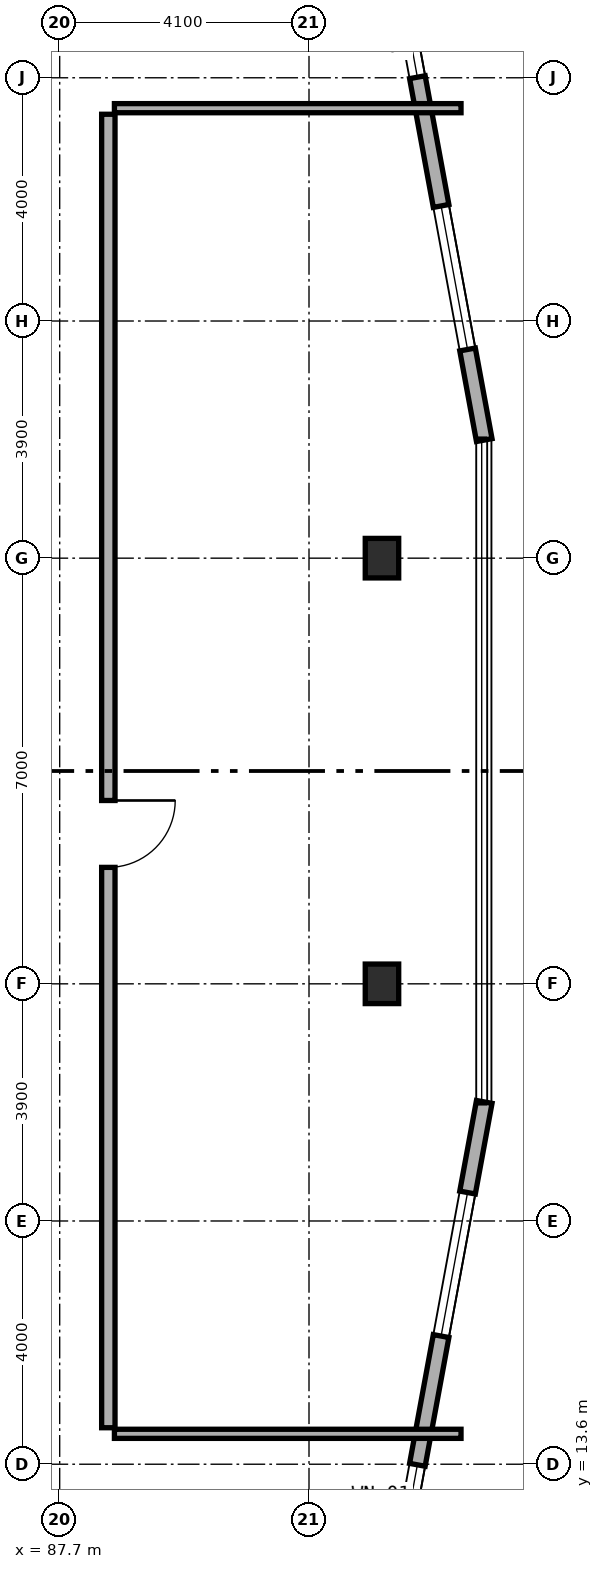
"""IFC4 building model, lengths in metres.
Left out: names, types, materials, properties, quantities, classifications, styles, units other than length and angle.
Written with IfcOpenShell. Run it as: python <this file> out.ifc"""

import sys

from ifc_helpers import new_model, si_unit, direction, frame, frame_2d, origin, origin_2d, place, context, subcontext, project, spatial, rectangle, extrude, element, fill, save


model = new_model("IFC4")
c1 = context("Model", 3, precision=1e-05, world=origin(), true_north=direction((0.0, 1.0)))
c2 = subcontext(c1, "Body", "Model", "MODEL_VIEW")
j1 = project(units=[si_unit("LENGTHUNIT", "METRE"), si_unit("PLANEANGLEUNIT", "RADIAN")], contexts=[c1])
p1 = place(None, origin())
s1 = spatial("IfcSite", under=j1, at=p1, CompositionType="ELEMENT")
p2 = place(p1, origin())
s2 = spatial("IfcBuilding", under=s1, at=p2, CompositionType="ELEMENT")
p3 = place(p2, frame((0.0, 0.0, 119.5)))
s3 = spatial("IfcBuildingStorey", under=s2, at=p3, CompositionType="ELEMENT", Elevation=119.5)
for number, where, z_axis, x_axis in (
    (1, (93.0, 21.5, 0.0), (0.0, 0.0, 1.0), (1.0, 0.0, 0.0)),
    (2, (93.0, 28.5, 0.0), (0.0, 0.0, 1.0), (1.0, 0.0, 0.0)),
):
    element("IfcColumn", number, at=place(p3, frame(where, z_axis=z_axis, x_axis=x_axis)), inside=s3, PredefinedType="COLUMN", context=c2, shape_type="SweptSolid", body=[
        extrude(rectangle(XDim=0.55, YDim=0.65, at=origin_2d()), origin(), (0.0, 0.0, 1.0), 4.5),
    ])
p4 = place(p3, frame((93.071, 10.816, 0.0), z_axis=(0.0, 0.0, 1.0), x_axis=(0.181209963057, 0.983444431215, 0.0)))
e3 = element("IfcWall", 3, at=p4, inside=s3, PredefinedType="STANDARD", context=c2, shape_type="SweptSolid", body=[
    extrude(rectangle(XDim=8.889, YDim=0.26, at=frame_2d((4.445, 0.0))), origin(), (0.0, 0.0, 1.0), 4.25),
])
p5 = place(p4, frame((1.621, 0.0, 0.85)))
e4 = element("IfcOpeningElement", 4, at=p5, cuts=e3, PredefinedType="OPENING", context=c2, shape_type="SweptSolid", body=[
    extrude(rectangle(XDim=1.2, YDim=1.5, at=frame_2d((0.6, 0.75))), frame((0.0, 0.14, 0.0), z_axis=(0.0, -1.0, 0.0), x_axis=(1.0, 0.0, 0.0)), (0.0, 0.0, 1.0), 0.28),
])
p6 = place(p4, frame((4.974, 0.0, 0.8)))
e5 = element("IfcOpeningElement", 5, at=p6, cuts=e3, PredefinedType="OPENING", context=c2, shape_type="SweptSolid", body=[
    extrude(rectangle(XDim=2.4, YDim=1.6, at=frame_2d((1.2, 0.8))), frame((0.0, 0.14, 0.0), z_axis=(0.0, -1.0, 0.0), x_axis=(1.0, 0.0, 0.0)), (0.0, 0.0, 1.0), 0.28),
])
p7 = place(p3, frame((94.682, 30.442, 0.0), z_axis=(0.0, 0.0, 1.0), x_axis=(-0.181209963057, 0.983444431215, 0.0)))
e6 = element("IfcWall", 6, at=p7, inside=s3, PredefinedType="STANDARD", context=c2, shape_type="SweptSolid", body=[
    extrude(rectangle(XDim=8.889, YDim=0.26, at=frame_2d((4.445, 0.0))), origin(), (0.0, 0.0, 1.0), 4.25),
])
p8 = place(p7, frame((1.515, 0.0, 0.8)))
e7 = element("IfcOpeningElement", 7, at=p8, cuts=e6, PredefinedType="OPENING", context=c2, shape_type="SweptSolid", body=[
    extrude(rectangle(XDim=2.4, YDim=1.6, at=frame_2d((1.2, 0.8))), frame((0.0, 0.14, 0.0), z_axis=(0.0, -1.0, 0.0), x_axis=(1.0, 0.0, 0.0)), (0.0, 0.0, 1.0), 0.28),
])
p9 = place(p7, frame((6.068, 0.0, 0.85)))
e8 = element("IfcOpeningElement", 8, at=p9, cuts=e6, PredefinedType="OPENING", context=c2, shape_type="SweptSolid", body=[
    extrude(rectangle(XDim=1.2, YDim=1.5, at=frame_2d((0.6, 0.75))), frame((0.0, 0.14, 0.0), z_axis=(0.0, -1.0, 0.0), x_axis=(1.0, 0.0, 0.0)), (0.0, 0.0, 1.0), 0.28),
])
for number, where, z_axis, x_axis in (
    (9, (88.6, 14.1, 0.0), (0.0, 0.0, 1.0), (1.0, 0.0, 0.0)),
    (10, (88.6, 35.9, 0.0), (0.0, 0.0, 1.0), (1.0, 0.0, 0.0)),
):
    element("IfcWall", number, at=place(p3, frame(where, z_axis=z_axis, x_axis=x_axis)), inside=s3, PredefinedType="PARTITIONING", context=c2, shape_type="SweptSolid", body=[
        extrude(rectangle(XDim=5.7, YDim=0.15, at=frame_2d((2.85, 0.0))), origin(), (0.0, 0.0, 1.0), 3.945),
    ])
p10 = place(p3, frame((88.5, 14.2, 0.0), z_axis=(0.0, 0.0, 1.0), x_axis=(0.0, 1.0, 0.0)))
e11 = element("IfcWall", 11, at=p10, inside=s3, PredefinedType="SOLIDWALL", context=c2, shape_type="SweptSolid", body=[
    extrude(rectangle(XDim=21.6, YDim=0.22, at=frame_2d((10.8, 0.0))), origin(), (0.0, 0.0, 1.0), 3.825),
])
p11 = place(p10, frame((9.215, 0.0, 0.0)))
e12 = element("IfcOpeningElement", 12, at=p11, cuts=e11, PredefinedType="OPENING", context=c2, shape_type="SweptSolid", body=[
    extrude(rectangle(XDim=1.1, YDim=2.1, at=frame_2d((0.55, 1.05))), frame((0.0, 0.12, 0.0), z_axis=(0.0, -1.0, 0.0), x_axis=(1.0, 0.0, 0.0)), (0.0, 0.0, 1.0), 0.24),
])
p12 = place(p5, origin())
e13 = element("IfcWindow", 13, at=p12, inside=s3, PartitioningType="SINGLE_PANEL", PredefinedType="WINDOW", context=c2, shape_type="SweptSolid", body=[
    extrude(rectangle(XDim=1.2, YDim=1.5, at=frame_2d((0.6, 0.75))), frame((0.0, 0.03, 0.0), z_axis=(0.0, -1.0, 0.0), x_axis=(1.0, 0.0, 0.0)), (0.0, 0.0, 1.0), 0.06),
])
fill(e4, e13)
p13 = place(p6, origin())
e14 = element("IfcWindow", 14, at=p13, inside=s3, PartitioningType="SINGLE_PANEL", PredefinedType="WINDOW", context=c2, shape_type="SweptSolid", body=[
    extrude(rectangle(XDim=2.4, YDim=1.6, at=frame_2d((1.2, 0.8))), frame((0.0, 0.03, 0.0), z_axis=(0.0, -1.0, 0.0), x_axis=(1.0, 0.0, 0.0)), (0.0, 0.0, 1.0), 0.06),
])
fill(e5, e14)
p14 = place(p8, origin())
e15 = element("IfcWindow", 15, at=p14, inside=s3, PartitioningType="SINGLE_PANEL", PredefinedType="WINDOW", context=c2, shape_type="SweptSolid", body=[
    extrude(rectangle(XDim=2.4, YDim=1.6, at=frame_2d((1.2, 0.8))), frame((0.0, 0.03, 0.0), z_axis=(0.0, -1.0, 0.0), x_axis=(1.0, 0.0, 0.0)), (0.0, 0.0, 1.0), 0.06),
])
fill(e7, e15)
p15 = place(p9, origin())
e16 = element("IfcWindow", 16, at=p15, inside=s3, PartitioningType="SINGLE_PANEL", PredefinedType="WINDOW", context=c2, shape_type="SweptSolid", body=[
    extrude(rectangle(XDim=1.2, YDim=1.5, at=frame_2d((0.6, 0.75))), frame((0.0, 0.03, 0.0), z_axis=(0.0, -1.0, 0.0), x_axis=(1.0, 0.0, 0.0)), (0.0, 0.0, 1.0), 0.06),
])
fill(e8, e16)
p16 = place(p11, frame((1.1, 0.0, 0.0), z_axis=(0.0, 0.0, 1.0), x_axis=(-1.0, 0.0, 0.0)))
e17 = element("IfcDoor", 17, at=p16, inside=s3, OperationType="SINGLE_SWING_LEFT", PredefinedType="DOOR", context=c2, shape_type="SweptSolid", body=[
    extrude(rectangle(XDim=1.1, YDim=2.1, at=frame_2d((0.55, 1.05))), frame((0.0, 0.025, 0.0), z_axis=(0.0, -1.0, 0.0), x_axis=(1.0, 0.0, 0.0)), (0.0, 0.0, 1.0), 0.05),
])
fill(e12, e17)
save(model, sys.argv[1])
